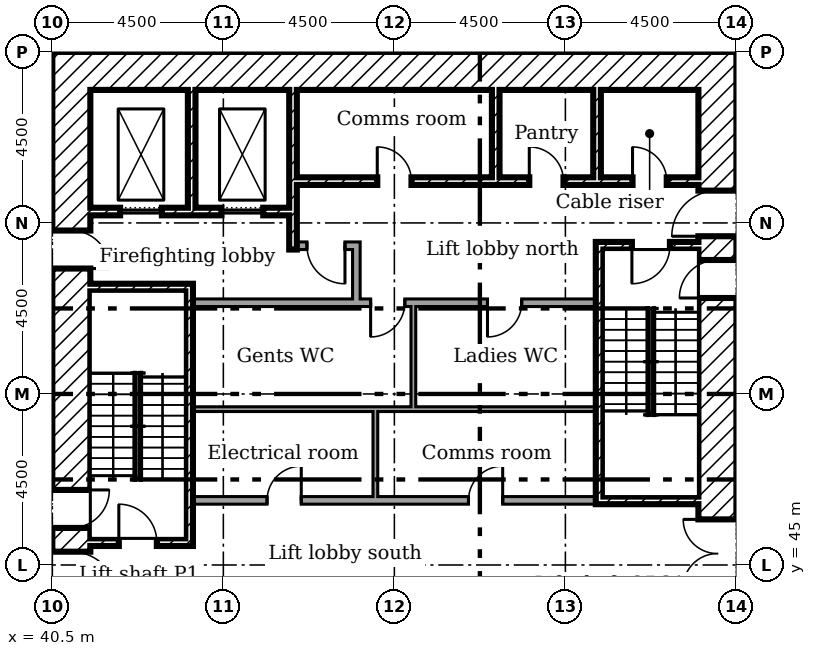
"""IFC4 building model, lengths in metres.
Left out: names, types, materials, properties, quantities, classifications, styles, units other than length and angle.
Written with IfcOpenShell. Run it as: python <this file> out.ifc"""

import sys

from ifc_helpers import new_model, si_unit, direction, frame, frame_2d, origin, place, context, subcontext, project, spatial, rectangle, extrude, element, fill, save


model = new_model("IFC4")
c1 = context("Model", 3, precision=1e-05, world=origin(), true_north=direction((0.0, 1.0)))
c2 = subcontext(c1, "Body", "Model", "MODEL_VIEW")
j1 = project(units=[si_unit("LENGTHUNIT", "METRE"), si_unit("PLANEANGLEUNIT", "RADIAN")], contexts=[c1])
p1 = place(None, origin())
s1 = spatial("IfcSite", under=j1, at=p1, CompositionType="ELEMENT")
p2 = place(p1, origin())
s2 = spatial("IfcBuilding", under=s1, at=p2, CompositionType="ELEMENT")
p3 = place(p2, frame((0.0, 0.0, 6.0)))
s3 = spatial("IfcBuildingStorey", under=s2, at=p3, CompositionType="ELEMENT", Elevation=6.0)
p4 = place(p3, frame((58.0, 40.5, 0.0), z_axis=(0.0, 0.0, 1.0), x_axis=(0.0, 1.0, 0.0)))
e1 = element("IfcWall", 1, at=p4, inside=s3, PredefinedType="SHEAR", context=c2, shape_type="SweptSolid", body=[
    extrude(rectangle(XDim=18.0, YDim=1.0, at=frame_2d((9.0, 0.0))), origin(), (0.0, 0.0, 1.0), 5.0),
])
p5 = place(p4, frame((13.15, 0.0, 0.0)))
e2 = element("IfcOpeningElement", 2, at=p5, cuts=e1, PredefinedType="OPENING", context=c2, shape_type="SweptSolid", body=[
    extrude(rectangle(XDim=1.2, YDim=2.1, at=frame_2d((0.6, 1.05))), frame((0.0, 0.51, 0.0), z_axis=(0.0, -1.0, 0.0), x_axis=(1.0, 0.0, 0.0)), (0.0, 0.0, 1.0), 1.02),
])
p6 = place(p4, frame((3.9, 0.0, 0.0)))
e3 = element("IfcOpeningElement", 3, at=p6, cuts=e1, PredefinedType="OPENING", context=c2, shape_type="SweptSolid", body=[
    extrude(rectangle(XDim=1.8, YDim=2.1, at=frame_2d((0.9, 1.05))), frame((0.0, 0.51, 0.0), z_axis=(0.0, -1.0, 0.0), x_axis=(1.0, 0.0, 0.0)), (0.0, 0.0, 1.0), 1.02),
])
p7 = place(p4, frame((11.525, 0.0, 0.0)))
e4 = element("IfcOpeningElement", 4, at=p7, cuts=e1, PredefinedType="OPENING", context=c2, shape_type="SweptSolid", body=[
    extrude(rectangle(XDim=1.0, YDim=2.1, at=frame_2d((0.5, 1.05))), frame((0.0, 0.51, 0.0), z_axis=(0.0, -1.0, 0.0), x_axis=(1.0, 0.0, 0.0)), (0.0, 0.0, 1.0), 1.02),
])
p8 = place(p3, frame((41.5, 58.0, 0.0)))
e5 = element("IfcWall", 5, at=p8, inside=s3, PredefinedType="SHEAR", context=c2, shape_type="SweptSolid", body=[
    extrude(rectangle(XDim=16.0, YDim=1.0, at=frame_2d((8.0, 0.0))), origin(), (0.0, 0.0, 1.0), 5.0),
])
p9 = place(p3, frame((41.0, 40.5, 0.0), z_axis=(0.0, 0.0, 1.0), x_axis=(0.0, 1.0, 0.0)))
e6 = element("IfcWall", 6, at=p9, inside=s3, PredefinedType="SHEAR", context=c2, shape_type="SweptSolid", body=[
    extrude(rectangle(XDim=18.0, YDim=1.0, at=frame_2d((9.0, 0.0))), origin(), (0.0, 0.0, 1.0), 5.0),
])
p10 = place(p9, frame((3.65, 0.0, 0.0)))
e7 = element("IfcOpeningElement", 7, at=p10, cuts=e6, PredefinedType="OPENING", context=c2, shape_type="SweptSolid", body=[
    extrude(rectangle(XDim=1.2, YDim=2.1, at=frame_2d((0.6, 1.05))), frame((0.0, 0.51, 0.0), z_axis=(0.0, -1.0, 0.0), x_axis=(1.0, 0.0, 0.0)), (0.0, 0.0, 1.0), 1.02),
])
p11 = place(p9, frame((5.475, 0.0, 0.0)))
e8 = element("IfcOpeningElement", 8, at=p11, cuts=e6, PredefinedType="OPENING", context=c2, shape_type="SweptSolid", body=[
    extrude(rectangle(XDim=1.0, YDim=2.1, at=frame_2d((0.5, 1.05))), frame((0.0, 0.51, 0.0), z_axis=(0.0, -1.0, 0.0), x_axis=(1.0, 0.0, 0.0)), (0.0, 0.0, 1.0), 1.02),
])
p12 = place(p9, frame((12.3, 0.0, 0.0)))
e9 = element("IfcOpeningElement", 9, at=p12, cuts=e6, PredefinedType="OPENING", context=c2, shape_type="SweptSolid", body=[
    extrude(rectangle(XDim=1.0, YDim=2.1, at=frame_2d((0.5, 1.05))), frame((0.0, 0.51, 0.0), z_axis=(0.0, -1.0, 0.0), x_axis=(1.0, 0.0, 0.0)), (0.0, 0.0, 1.0), 1.02),
])
p13 = place(p3, frame((44.167, 57.5, 0.0), z_axis=(0.0, 0.0, 1.0), x_axis=(0.0, -1.0, 0.0)))
e10 = element("IfcWall", 10, at=p13, inside=s3, PredefinedType="SHEAR", context=c2, shape_type="SweptSolid", body=[
    extrude(rectangle(XDim=3.1, YDim=0.2, at=frame_2d((1.55, 0.0))), origin(), (0.0, 0.0, 1.0), 5.0),
])
p14 = place(p3, frame((46.833, 57.5, 0.0), z_axis=(0.0, 0.0, 1.0), x_axis=(0.0, -1.0, 0.0)))
e11 = element("IfcWall", 11, at=p14, inside=s3, PredefinedType="SHEAR", context=c2, shape_type="SweptSolid", body=[
    extrude(rectangle(XDim=4.2, YDim=0.2, at=frame_2d((2.1, 0.0))), origin(), (0.0, 0.0, 1.0), 5.0),
])
for number, where, z_axis, x_axis in (
    (12, (52.167, 57.5, 0.0), (0.0, 0.0, 1.0), (0.0, -1.0, 0.0)),
    (13, (54.833, 57.5, 0.0), (0.0, 0.0, 1.0), (0.0, -1.0, 0.0)),
):
    element("IfcWall", number, at=place(p3, frame(where, z_axis=z_axis, x_axis=x_axis)), inside=s3, PredefinedType="SHEAR", context=c2, shape_type="SweptSolid", body=[
        extrude(rectangle(XDim=2.3, YDim=0.2, at=frame_2d((1.15, 0.0))), origin(), (0.0, 0.0, 1.0), 5.0),
    ])
p15 = place(p3, frame((48.5, 51.9, 0.0), z_axis=(0.0, 0.0, 1.0), x_axis=(0.0, 1.0, 0.0)))
e14 = element("IfcWall", 14, at=p15, inside=s3, PredefinedType="PARTITIONING", context=c2, shape_type="SweptSolid", body=[
    extrude(rectangle(XDim=1.6, YDim=0.2, at=frame_2d((0.8, 0.0))), origin(), (0.0, 0.0, 1.0), 5.0),
])
p16 = place(p3, frame((46.933, 53.4, 0.0)))
e15 = element("IfcWall", 15, at=p16, inside=s3, PredefinedType="PARTITIONING", context=c2, shape_type="SweptSolid", body=[
    extrude(rectangle(XDim=1.467, YDim=0.2, at=frame_2d((0.733, 0.0))), origin(), (0.0, 0.0, 1.0), 5.0),
])
p17 = place(p16, frame((0.267, 0.0, 0.0)))
e16 = element("IfcOpeningElement", 16, at=p17, cuts=e15, PredefinedType="OPENING", context=c2, shape_type="SweptSolid", body=[
    extrude(rectangle(XDim=1.0, YDim=2.1, at=frame_2d((0.5, 1.05))), frame((0.0, 0.11, 0.0), z_axis=(0.0, -1.0, 0.0), x_axis=(1.0, 0.0, 0.0)), (0.0, 0.0, 1.0), 0.22),
])
p18 = place(p3, frame((46.933, 55.1, 0.0)))
e17 = element("IfcWall", 17, at=p18, inside=s3, PredefinedType="SHEAR", context=c2, shape_type="SweptSolid", body=[
    extrude(rectangle(XDim=10.567, YDim=0.2, at=frame_2d((5.283, 0.0))), origin(), (0.0, 0.0, 1.0), 5.0),
])
p19 = place(p18, frame((8.833, 0.0, 0.0)))
e18 = element("IfcOpeningElement", 18, at=p19, cuts=e17, PredefinedType="OPENING", context=c2, shape_type="SweptSolid", body=[
    extrude(rectangle(XDim=0.9, YDim=2.1, at=frame_2d((0.45, 1.05))), frame((0.0, 0.11, 0.0), z_axis=(0.0, -1.0, 0.0), x_axis=(1.0, 0.0, 0.0)), (0.0, 0.0, 1.0), 0.22),
])
p20 = place(p18, frame((2.117, 0.0, 0.0)))
e19 = element("IfcOpeningElement", 19, at=p20, cuts=e17, PredefinedType="OPENING", context=c2, shape_type="SweptSolid", body=[
    extrude(rectangle(XDim=0.9, YDim=2.1, at=frame_2d((0.45, 1.05))), frame((0.0, 0.11, 0.0), z_axis=(0.0, -1.0, 0.0), x_axis=(1.0, 0.0, 0.0)), (0.0, 0.0, 1.0), 0.22),
])
p21 = place(p18, frame((6.117, 0.0, 0.0)))
e20 = element("IfcOpeningElement", 20, at=p21, cuts=e17, PredefinedType="OPENING", context=c2, shape_type="SweptSolid", body=[
    extrude(rectangle(XDim=0.9, YDim=2.1, at=frame_2d((0.45, 1.05))), frame((0.0, 0.11, 0.0), z_axis=(0.0, -1.0, 0.0), x_axis=(1.0, 0.0, 0.0)), (0.0, 0.0, 1.0), 0.22),
])
p22 = place(p3, frame((41.5, 54.3, 0.0)))
e21 = element("IfcWall", 21, at=p22, inside=s3, PredefinedType="SHEAR", context=c2, shape_type="SweptSolid", body=[
    extrude(rectangle(XDim=5.233, YDim=0.2, at=frame_2d((2.617, 0.0))), origin(), (0.0, 0.0, 1.0), 5.0),
])
p23 = place(p22, frame((0.783, 0.0, 0.0)))
e22 = element("IfcOpeningElement", 22, at=p23, cuts=e21, PredefinedType="OPENING", context=c2, shape_type="SweptSolid", body=[
    extrude(rectangle(XDim=1.1, YDim=2.1, at=frame_2d((0.55, 1.05))), frame((0.0, 0.11, 0.0), z_axis=(0.0, -1.0, 0.0), x_axis=(1.0, 0.0, 0.0)), (0.0, 0.0, 1.0), 0.22),
])
p24 = place(p22, frame((3.45, 0.0, 0.0)))
e23 = element("IfcOpeningElement", 23, at=p24, cuts=e21, PredefinedType="OPENING", context=c2, shape_type="SweptSolid", body=[
    extrude(rectangle(XDim=1.1, YDim=2.1, at=frame_2d((0.55, 1.05))), frame((0.0, 0.11, 0.0), z_axis=(0.0, -1.0, 0.0), x_axis=(1.0, 0.0, 0.0)), (0.0, 0.0, 1.0), 0.22),
])
p25 = place(p3, frame((44.1, 45.5, 0.0), z_axis=(0.0, 0.0, 1.0), x_axis=(0.0, 1.0, 0.0)))
e24 = element("IfcWall", 24, at=p25, inside=s3, PredefinedType="SHEAR", context=c2, shape_type="SweptSolid", body=[
    extrude(rectangle(XDim=6.9, YDim=0.2, at=frame_2d((3.45, 0.0))), origin(), (0.0, 0.0, 1.0), 5.0),
])
p26 = place(p3, frame((41.5, 52.3, 0.0)))
e25 = element("IfcWall", 25, at=p26, inside=s3, PredefinedType="SHEAR", context=c2, shape_type="SweptSolid", body=[
    extrude(rectangle(XDim=2.5, YDim=0.2, at=frame_2d((1.25, 0.0))), origin(), (0.0, 0.0, 1.0), 5.0),
])
p27 = place(p3, frame((41.5, 45.6, 0.0)))
e26 = element("IfcWall", 26, at=p27, inside=s3, PredefinedType="SHEAR", context=c2, shape_type="SweptSolid", body=[
    extrude(rectangle(XDim=2.5, YDim=0.2, at=frame_2d((1.25, 0.0))), origin(), (0.0, 0.0, 1.0), 5.0),
])
p28 = place(p27, frame((0.75, 0.0, 0.0)))
e27 = element("IfcOpeningElement", 27, at=p28, cuts=e26, PredefinedType="OPENING", context=c2, shape_type="SweptSolid", body=[
    extrude(rectangle(XDim=1.0, YDim=2.1, at=frame_2d((0.5, 1.05))), frame((0.0, 0.11, 0.0), z_axis=(0.0, -1.0, 0.0), x_axis=(1.0, 0.0, 0.0)), (0.0, 0.0, 1.0), 0.22),
])
p29 = place(p3, frame((54.8, 53.4, 0.0)))
e28 = element("IfcWall", 28, at=p29, inside=s3, PredefinedType="SHEAR", context=c2, shape_type="SweptSolid", body=[
    extrude(rectangle(XDim=2.7, YDim=0.2, at=frame_2d((1.35, 0.0))), origin(), (0.0, 0.0, 1.0), 5.0),
])
p30 = place(p29, frame((0.95, 0.0, 0.0)))
e29 = element("IfcOpeningElement", 29, at=p30, cuts=e28, PredefinedType="OPENING", context=c2, shape_type="SweptSolid", body=[
    extrude(rectangle(XDim=1.0, YDim=2.1, at=frame_2d((0.5, 1.05))), frame((0.0, 0.11, 0.0), z_axis=(0.0, -1.0, 0.0), x_axis=(1.0, 0.0, 0.0)), (0.0, 0.0, 1.0), 0.22),
])
p31 = place(p3, frame((54.8, 46.7, 0.0)))
e30 = element("IfcWall", 30, at=p31, inside=s3, PredefinedType="SHEAR", context=c2, shape_type="SweptSolid", body=[
    extrude(rectangle(XDim=2.7, YDim=0.2, at=frame_2d((1.35, 0.0))), origin(), (0.0, 0.0, 1.0), 5.0),
])
p32 = place(p3, frame((54.9, 46.8, 0.0), z_axis=(0.0, 0.0, 1.0), x_axis=(0.0, 1.0, 0.0)))
e31 = element("IfcWall", 31, at=p32, inside=s3, PredefinedType="SHEAR", context=c2, shape_type="SweptSolid", body=[
    extrude(rectangle(XDim=6.5, YDim=0.2, at=frame_2d((3.25, 0.0))), origin(), (0.0, 0.0, 1.0), 5.0),
])
p33 = place(p3, frame((44.2, 51.9, 0.0)))
e32 = element("IfcWall", 32, at=p33, inside=s3, PredefinedType="PARTITIONING", context=c2, shape_type="SweptSolid", body=[
    extrude(rectangle(XDim=10.6, YDim=0.2, at=frame_2d((5.3, 0.0))), origin(), (0.0, 0.0, 1.0), 5.0),
])
p34 = place(p33, frame((4.675, 0.0, 0.0)))
e33 = element("IfcOpeningElement", 33, at=p34, cuts=e32, PredefinedType="OPENING", context=c2, shape_type="SweptSolid", body=[
    extrude(rectangle(XDim=0.9, YDim=2.1, at=frame_2d((0.45, 1.05))), frame((0.0, 0.11, 0.0), z_axis=(0.0, -1.0, 0.0), x_axis=(1.0, 0.0, 0.0)), (0.0, 0.0, 1.0), 0.22),
])
p35 = place(p33, frame((7.75, 0.0, 0.0)))
e34 = element("IfcOpeningElement", 34, at=p35, cuts=e32, PredefinedType="OPENING", context=c2, shape_type="SweptSolid", body=[
    extrude(rectangle(XDim=0.9, YDim=2.1, at=frame_2d((0.45, 1.05))), frame((0.0, 0.11, 0.0), z_axis=(0.0, -1.0, 0.0), x_axis=(1.0, 0.0, 0.0)), (0.0, 0.0, 1.0), 0.22),
])
p36 = place(p3, frame((44.2, 46.7, 0.0)))
e35 = element("IfcWall", 35, at=p36, inside=s3, PredefinedType="PARTITIONING", context=c2, shape_type="SweptSolid", body=[
    extrude(rectangle(XDim=10.6, YDim=0.2, at=frame_2d((5.3, 0.0))), origin(), (0.0, 0.0, 1.0), 5.0),
])
p37 = place(p36, frame((1.95, 0.0, 0.0)))
e36 = element("IfcOpeningElement", 36, at=p37, cuts=e35, PredefinedType="OPENING", context=c2, shape_type="SweptSolid", body=[
    extrude(rectangle(XDim=0.9, YDim=2.1, at=frame_2d((0.45, 1.05))), frame((0.0, 0.11, 0.0), z_axis=(0.0, -1.0, 0.0), x_axis=(1.0, 0.0, 0.0)), (0.0, 0.0, 1.0), 0.22),
])
p38 = place(p36, frame((7.25, 0.0, 0.0)))
e37 = element("IfcOpeningElement", 37, at=p38, cuts=e35, PredefinedType="OPENING", context=c2, shape_type="SweptSolid", body=[
    extrude(rectangle(XDim=0.9, YDim=2.1, at=frame_2d((0.45, 1.05))), frame((0.0, 0.11, 0.0), z_axis=(0.0, -1.0, 0.0), x_axis=(1.0, 0.0, 0.0)), (0.0, 0.0, 1.0), 0.22),
])
p39 = place(p3, frame((49.0, 46.8, 0.0), z_axis=(0.0, 0.0, 1.0), x_axis=(0.0, 1.0, 0.0)))
e38 = element("IfcWall", 38, at=p39, inside=s3, PredefinedType="PARTITIONING", context=c2, shape_type="SweptSolid", body=[
    extrude(rectangle(XDim=2.363, YDim=0.125, at=frame_2d((1.181, 0.0))), origin(), (0.0, 0.0, 1.0), 5.0),
])
p40 = place(p3, frame((48.938, 49.1, 0.0), z_axis=(0.0, 0.0, 1.0), x_axis=(-1.0, 0.0, 0.0)))
e39 = element("IfcWall", 39, at=p40, inside=s3, PredefinedType="PARTITIONING", context=c2, shape_type="SweptSolid", body=[
    extrude(rectangle(XDim=4.738, YDim=0.125, at=frame_2d((2.369, 0.0))), origin(), (0.0, 0.0, 1.0), 5.0),
])
p41 = place(p3, frame((50.062, 49.1, 0.0), z_axis=(0.0, 0.0, 1.0), x_axis=(-1.0, 0.0, 0.0)))
e40 = element("IfcWall", 40, at=p41, inside=s3, PredefinedType="PARTITIONING", context=c2, shape_type="SweptSolid", body=[
    extrude(rectangle(XDim=1.062, YDim=0.125, at=frame_2d((0.531, 0.0))), origin(), (0.0, 0.0, 1.0), 5.0),
])
p42 = place(p3, frame((54.8, 49.1, 0.0), z_axis=(0.0, 0.0, 1.0), x_axis=(-1.0, 0.0, 0.0)))
e41 = element("IfcWall", 41, at=p42, inside=s3, PredefinedType="PARTITIONING", context=c2, shape_type="SweptSolid", body=[
    extrude(rectangle(XDim=4.8, YDim=0.125, at=frame_2d((2.4, 0.0))), origin(), (0.0, 0.0, 1.0), 5.0),
])
p43 = place(p3, frame((50.0, 49.163, 0.0), z_axis=(0.0, 0.0, 1.0), x_axis=(0.0, 1.0, 0.0)))
e42 = element("IfcWall", 42, at=p43, inside=s3, PredefinedType="PARTITIONING", context=c2, shape_type="SweptSolid", body=[
    extrude(rectangle(XDim=2.637, YDim=0.125, at=frame_2d((1.319, 0.0))), origin(), (0.0, 0.0, 1.0), 5.0),
])
p44 = place(p5, origin())
e43 = element("IfcDoor", 43, at=p44, inside=s3, OperationType="SINGLE_SWING_RIGHT", PredefinedType="DOOR", context=c2, shape_type="SweptSolid", body=[
    extrude(rectangle(XDim=1.2, YDim=2.1, at=frame_2d((0.6, 1.05))), frame((0.0, 0.025, 0.0), z_axis=(0.0, -1.0, 0.0), x_axis=(1.0, 0.0, 0.0)), (0.0, 0.0, 1.0), 0.05),
])
fill(e2, e43)
p45 = place(p6, origin())
e44 = element("IfcDoor", 44, at=p45, inside=s3, OperationType="DOUBLE_DOOR_SINGLE_SWING", PredefinedType="DOOR", context=c2, shape_type="SweptSolid", body=[
    extrude(rectangle(XDim=1.8, YDim=2.1, at=frame_2d((0.9, 1.05))), frame((0.0, 0.025, 0.0), z_axis=(0.0, -1.0, 0.0), x_axis=(1.0, 0.0, 0.0)), (0.0, 0.0, 1.0), 0.05),
])
fill(e3, e44)
p46 = place(p10, frame((1.2, 0.0, 0.0), x_axis=(-1.0, 0.0, 0.0)))
e45 = element("IfcDoor", 45, at=p46, inside=s3, OperationType="SINGLE_SWING_LEFT", PredefinedType="DOOR", context=c2, shape_type="SweptSolid", body=[
    extrude(rectangle(XDim=1.2, YDim=2.1, at=frame_2d((0.6, 1.05))), frame((0.0, 0.025, 0.0), z_axis=(0.0, -1.0, 0.0), x_axis=(1.0, 0.0, 0.0)), (0.0, 0.0, 1.0), 0.05),
])
fill(e7, e45)
p47 = place(p28, origin())
e46 = element("IfcDoor", 46, at=p47, inside=s3, OperationType="SINGLE_SWING_RIGHT", PredefinedType="DOOR", context=c2, shape_type="SweptSolid", body=[
    extrude(rectangle(XDim=1.0, YDim=2.1, at=frame_2d((0.5, 1.05))), frame((0.0, 0.025, 0.0), z_axis=(0.0, -1.0, 0.0), x_axis=(1.0, 0.0, 0.0)), (0.0, 0.0, 1.0), 0.05),
])
fill(e27, e46)
p48 = place(p11, frame((1.0, 0.0, 0.0), x_axis=(-1.0, 0.0, 0.0)))
e47 = element("IfcDoor", 47, at=p48, inside=s3, OperationType="SINGLE_SWING_RIGHT", PredefinedType="DOOR", context=c2, shape_type="SweptSolid", body=[
    extrude(rectangle(XDim=1.0, YDim=2.1, at=frame_2d((0.5, 1.05))), frame((0.0, 0.025, 0.0), z_axis=(0.0, -1.0, 0.0), x_axis=(1.0, 0.0, 0.0)), (0.0, 0.0, 1.0), 0.05),
])
fill(e8, e47)
p49 = place(p30, frame((1.0, 0.0, 0.0), x_axis=(-1.0, 0.0, 0.0)))
e48 = element("IfcDoor", 48, at=p49, inside=s3, OperationType="SINGLE_SWING_LEFT", PredefinedType="DOOR", context=c2, shape_type="SweptSolid", body=[
    extrude(rectangle(XDim=1.0, YDim=2.1, at=frame_2d((0.5, 1.05))), frame((0.0, 0.025, 0.0), z_axis=(0.0, -1.0, 0.0), x_axis=(1.0, 0.0, 0.0)), (0.0, 0.0, 1.0), 0.05),
])
fill(e29, e48)
p50 = place(p7, origin())
e49 = element("IfcDoor", 49, at=p50, inside=s3, OperationType="SINGLE_SWING_RIGHT", PredefinedType="DOOR", context=c2, shape_type="SweptSolid", body=[
    extrude(rectangle(XDim=1.0, YDim=2.1, at=frame_2d((0.5, 1.05))), frame((0.0, 0.025, 0.0), z_axis=(0.0, -1.0, 0.0), x_axis=(1.0, 0.0, 0.0)), (0.0, 0.0, 1.0), 0.05),
])
fill(e4, e49)
p51 = place(p17, frame((1.0, 0.0, 0.0), x_axis=(-1.0, 0.0, 0.0)))
e50 = element("IfcDoor", 50, at=p51, inside=s3, OperationType="SINGLE_SWING_RIGHT", PredefinedType="DOOR", context=c2, shape_type="SweptSolid", body=[
    extrude(rectangle(XDim=1.0, YDim=2.1, at=frame_2d((0.5, 1.05))), frame((0.0, 0.025, 0.0), z_axis=(0.0, -1.0, 0.0), x_axis=(1.0, 0.0, 0.0)), (0.0, 0.0, 1.0), 0.05),
])
fill(e16, e50)
p52 = place(p12, frame((1.0, 0.0, 0.0), x_axis=(-1.0, 0.0, 0.0)))
e51 = element("IfcDoor", 51, at=p52, inside=s3, OperationType="SINGLE_SWING_LEFT", PredefinedType="DOOR", context=c2, shape_type="SweptSolid", body=[
    extrude(rectangle(XDim=1.0, YDim=2.1, at=frame_2d((0.5, 1.05))), frame((0.0, 0.025, 0.0), z_axis=(0.0, -1.0, 0.0), x_axis=(1.0, 0.0, 0.0)), (0.0, 0.0, 1.0), 0.05),
])
fill(e9, e51)
p53 = place(p19, origin())
e52 = element("IfcDoor", 52, at=p53, inside=s3, OperationType="SINGLE_SWING_RIGHT", PredefinedType="DOOR", context=c2, shape_type="SweptSolid", body=[
    extrude(rectangle(XDim=0.9, YDim=2.1, at=frame_2d((0.45, 1.05))), frame((0.0, 0.025, 0.0), z_axis=(0.0, -1.0, 0.0), x_axis=(1.0, 0.0, 0.0)), (0.0, 0.0, 1.0), 0.05),
])
fill(e18, e52)
p54 = place(p20, origin())
e53 = element("IfcDoor", 53, at=p54, inside=s3, OperationType="SINGLE_SWING_RIGHT", PredefinedType="DOOR", context=c2, shape_type="SweptSolid", body=[
    extrude(rectangle(XDim=0.9, YDim=2.1, at=frame_2d((0.45, 1.05))), frame((0.0, 0.025, 0.0), z_axis=(0.0, -1.0, 0.0), x_axis=(1.0, 0.0, 0.0)), (0.0, 0.0, 1.0), 0.05),
])
fill(e19, e53)
p55 = place(p21, origin())
e54 = element("IfcDoor", 54, at=p55, inside=s3, OperationType="SINGLE_SWING_RIGHT", PredefinedType="DOOR", context=c2, shape_type="SweptSolid", body=[
    extrude(rectangle(XDim=0.9, YDim=2.1, at=frame_2d((0.45, 1.05))), frame((0.0, 0.025, 0.0), z_axis=(0.0, -1.0, 0.0), x_axis=(1.0, 0.0, 0.0)), (0.0, 0.0, 1.0), 0.05),
])
fill(e20, e54)
p56 = place(p37, origin())
e55 = element("IfcDoor", 55, at=p56, inside=s3, OperationType="SINGLE_SWING_LEFT", PredefinedType="DOOR", context=c2, shape_type="SweptSolid", body=[
    extrude(rectangle(XDim=0.9, YDim=2.1, at=frame_2d((0.45, 1.05))), frame((0.0, 0.025, 0.0), z_axis=(0.0, -1.0, 0.0), x_axis=(1.0, 0.0, 0.0)), (0.0, 0.0, 1.0), 0.05),
])
fill(e36, e55)
p57 = place(p38, origin())
e56 = element("IfcDoor", 56, at=p57, inside=s3, OperationType="SINGLE_SWING_LEFT", PredefinedType="DOOR", context=c2, shape_type="SweptSolid", body=[
    extrude(rectangle(XDim=0.9, YDim=2.1, at=frame_2d((0.45, 1.05))), frame((0.0, 0.025, 0.0), z_axis=(0.0, -1.0, 0.0), x_axis=(1.0, 0.0, 0.0)), (0.0, 0.0, 1.0), 0.05),
])
fill(e37, e56)
p58 = place(p34, frame((0.9, 0.0, 0.0), x_axis=(-1.0, 0.0, 0.0)))
e57 = element("IfcDoor", 57, at=p58, inside=s3, OperationType="SINGLE_SWING_LEFT", PredefinedType="DOOR", context=c2, shape_type="SweptSolid", body=[
    extrude(rectangle(XDim=0.9, YDim=2.1, at=frame_2d((0.45, 1.05))), frame((0.0, 0.025, 0.0), z_axis=(0.0, -1.0, 0.0), x_axis=(1.0, 0.0, 0.0)), (0.0, 0.0, 1.0), 0.05),
])
fill(e33, e57)
p59 = place(p35, frame((0.9, 0.0, 0.0), x_axis=(-1.0, 0.0, 0.0)))
e58 = element("IfcDoor", 58, at=p59, inside=s3, OperationType="SINGLE_SWING_LEFT", PredefinedType="DOOR", context=c2, shape_type="SweptSolid", body=[
    extrude(rectangle(XDim=0.9, YDim=2.1, at=frame_2d((0.45, 1.05))), frame((0.0, 0.025, 0.0), z_axis=(0.0, -1.0, 0.0), x_axis=(1.0, 0.0, 0.0)), (0.0, 0.0, 1.0), 0.05),
])
fill(e34, e58)
p60 = place(p23, origin())
e59 = element("IfcDoor", 59, at=p60, inside=s3, OperationType="SLIDING_TO_LEFT", PredefinedType="DOOR", context=c2, shape_type="SweptSolid", body=[
    extrude(rectangle(XDim=1.1, YDim=2.1, at=frame_2d((0.55, 1.05))), frame((0.0, 0.025, 0.0), z_axis=(0.0, -1.0, 0.0), x_axis=(1.0, 0.0, 0.0)), (0.0, 0.0, 1.0), 0.05),
])
fill(e22, e59)
p61 = place(p24, origin())
e60 = element("IfcDoor", 60, at=p61, inside=s3, OperationType="SLIDING_TO_LEFT", PredefinedType="DOOR", context=c2, shape_type="SweptSolid", body=[
    extrude(rectangle(XDim=1.1, YDim=2.1, at=frame_2d((0.55, 1.05))), frame((0.0, 0.025, 0.0), z_axis=(0.0, -1.0, 0.0), x_axis=(1.0, 0.0, 0.0)), (0.0, 0.0, 1.0), 0.05),
])
fill(e23, e60)
save(model, sys.argv[1])
